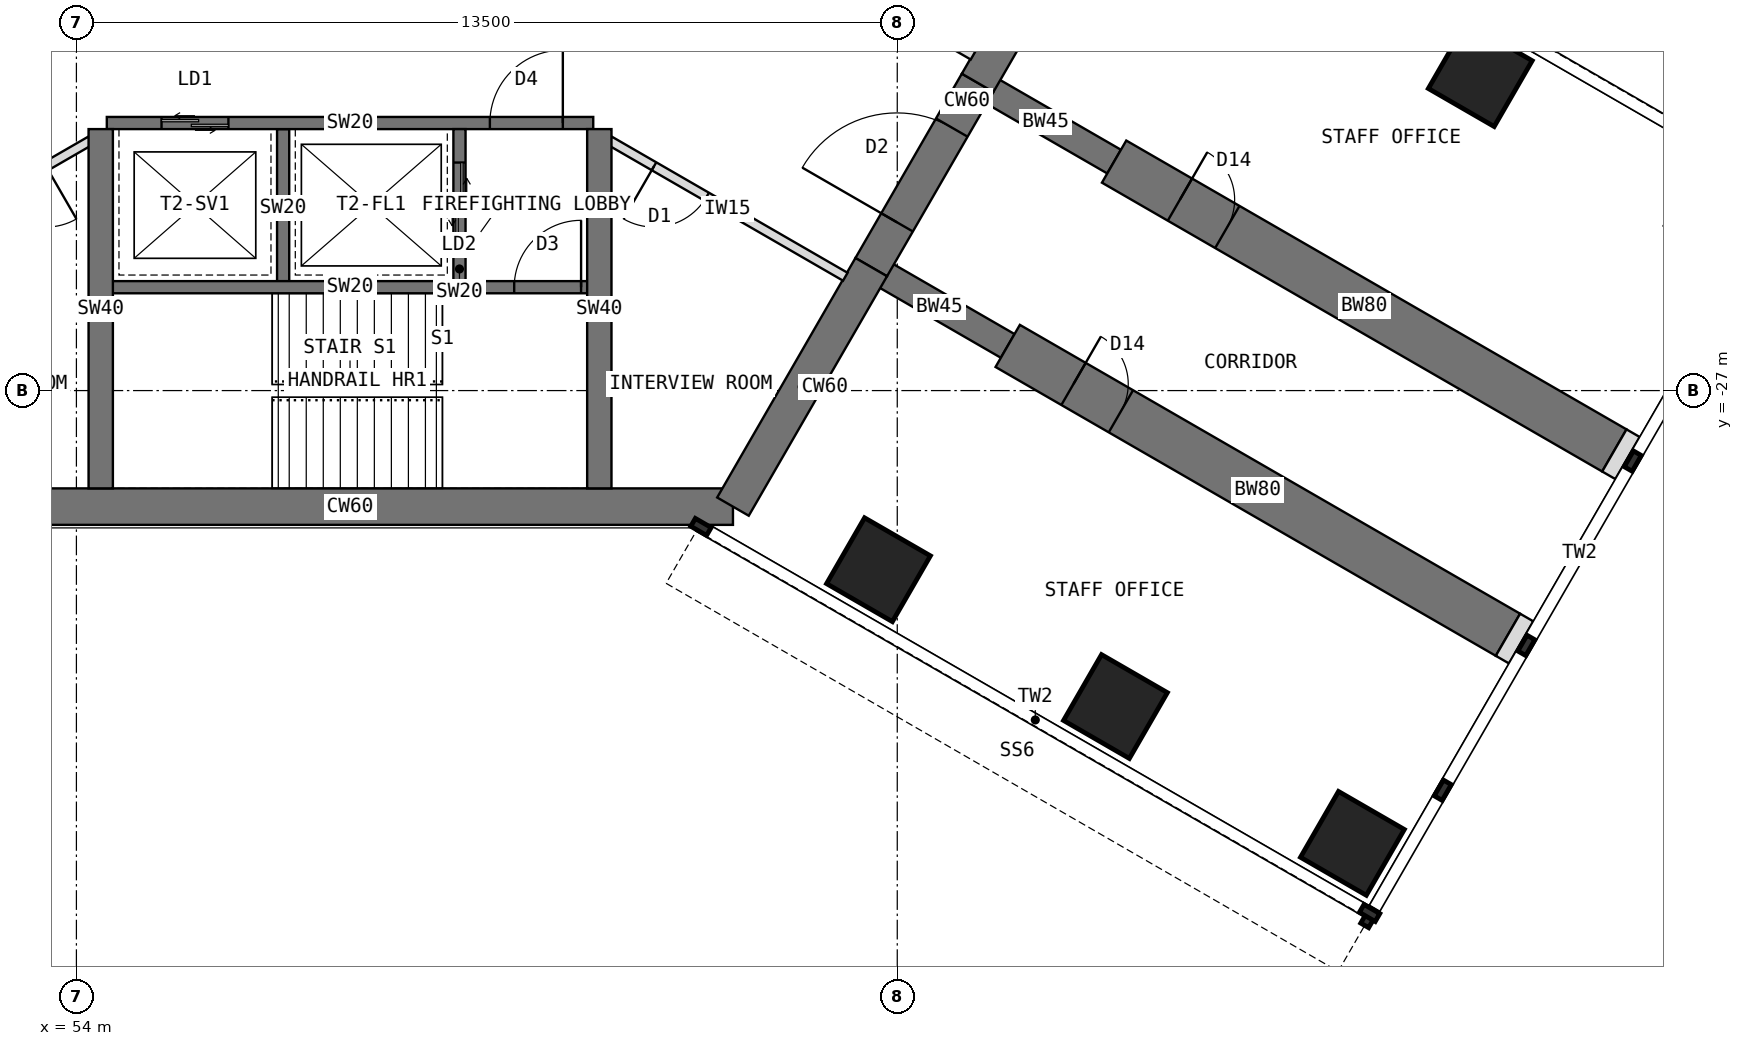
"""IFC4 building model, lengths in metres.
Left out: names, types, materials, properties, quantities, classifications, styles, units other than length and angle.
Written with IfcOpenShell. Run it as: python <this file> out.ifc"""

import sys

from ifc_helpers import new_model, si_unit, direction, frame, frame_2d, origin, origin_2d, place, context, subcontext, project, spatial, rectangle, extrude, element, fill, save


model = new_model("IFC4")
c1 = context("Model", 3, precision=1e-05, world=origin(), true_north=direction((0.0, 1.0)))
c2 = subcontext(c1, "Body", "Model", "MODEL_VIEW")
j1 = project(units=[si_unit("LENGTHUNIT", "METRE"), si_unit("PLANEANGLEUNIT", "RADIAN")], contexts=[c1])
p1 = place(None, origin())
s1 = spatial("IfcSite", under=j1, at=p1, CompositionType="ELEMENT")
p2 = place(p1, origin())
s2 = spatial("IfcBuilding", under=s1, at=p2, CompositionType="ELEMENT")
p3 = place(p2, frame((0.0, 0.0, 157.5)))
s3 = spatial("IfcBuildingStorey", under=s2, at=p3, CompositionType="ELEMENT", Elevation=157.5)
p4 = place(p3, frame((52.202, -28.908, 0.0), z_axis=(0.0, 0.0, 1.0), x_axis=(1.0, 0.0, 0.0)))
e1 = element("IfcWall", 1, at=p4, inside=s3, PredefinedType="SHEAR", context=c2, shape_type="SweptSolid", body=[
    extrude(rectangle(XDim=12.596, YDim=0.6, at=frame_2d((6.298, 0.0))), origin(), (0.0, 0.0, 1.0), 4.0),
])
p5 = place(p3, frame((64.798, -28.908, 0.0), z_axis=(0.0, 0.0, 1.0), x_axis=(0.499984222037, 0.866034513004, 0.0)))
e2 = element("IfcWall", 2, at=p5, inside=s3, PredefinedType="SHEAR", context=c2, shape_type="SweptSolid", body=[
    extrude(rectangle(XDim=4.548, YDim=0.6, at=frame_2d((2.274, 0.0))), origin(), (0.0, 0.0, 1.0), 4.0),
])
p6 = place(p3, frame((67.072, -24.97, 0.0), z_axis=(0.0, 0.0, 1.0), x_axis=(0.500010275428, 0.866019471182, 0.0)))
e3 = element("IfcWall", 3, at=p6, inside=s3, PredefinedType="SHEAR", context=c2, shape_type="SweptSolid", body=[
    extrude(rectangle(XDim=3.5, YDim=0.6, at=frame_2d((1.75, 0.0))), origin(), (0.0, 0.0, 1.0), 4.0),
])
p7 = place(p6, frame((0.85, 0.0, 0.0)))
e4 = element("IfcOpeningElement", 4, at=p7, cuts=e3, PredefinedType="OPENING", context=c2, shape_type="SweptSolid", body=[
    extrude(rectangle(XDim=1.8, YDim=2.1, at=frame_2d((0.9, 1.05))), frame((0.0, 0.31, 0.0), z_axis=(0.0, -1.0, 0.0), x_axis=(1.0, 0.0, 0.0)), (0.0, 0.0, 1.0), 0.62),
])
p8 = place(p3, frame((68.822, -21.939, 0.0), z_axis=(0.0, 0.0, 1.0), x_axis=(0.500024481964, 0.866011268655, 0.0)))
e5 = element("IfcWall", 5, at=p8, inside=s3, PredefinedType="SHEAR", context=c2, shape_type="SweptSolid", body=[
    extrude(rectangle(XDim=4.548, YDim=0.6, at=frame_2d((2.274, 0.0))), origin(), (0.0, 0.0, 1.0), 4.0),
])
p9 = place(p3, frame((68.822, -21.939, 0.0), z_axis=(0.0, 0.0, 1.0), x_axis=(0.866072649678, -0.499918158782, 0.0)))
e6 = element("IfcWall", 6, at=p9, inside=s3, PredefinedType="SHEAR", context=c2, shape_type="SweptSolid", body=[
    extrude(rectangle(XDim=2.592, YDim=0.45, at=frame_2d((1.296, 0.0))), origin(), (0.0, 0.0, 1.0), 4.0),
])
p10 = place(p3, frame((71.066, -23.234, 0.0), z_axis=(0.0, 0.0, 1.0), x_axis=(0.86602681393, -0.499997557548, 0.0)))
e7 = element("IfcWall", 7, at=p10, inside=s3, PredefinedType="SHEAR", context=c2, shape_type="SweptSolid", body=[
    extrude(rectangle(XDim=9.5, YDim=0.8, at=frame_2d((4.75, 0.0))), origin(), (0.0, 0.0, 1.0), 4.0),
])
p11 = place(p10, frame((1.25, 0.0, 0.0)))
e8 = element("IfcOpeningElement", 8, at=p11, cuts=e7, PredefinedType="OPENING", context=c2, shape_type="SweptSolid", body=[
    extrude(rectangle(XDim=0.9, YDim=2.1, at=frame_2d((0.45, 1.05))), frame((0.0, 0.41, 0.0), z_axis=(0.0, -1.0, 0.0), x_axis=(1.0, 0.0, 0.0)), (0.0, 0.0, 1.0), 0.82),
])
p12 = place(p3, frame((67.072, -24.97, 0.0), z_axis=(0.0, 0.0, 1.0), x_axis=(0.866031863473, -0.499988811324, 0.0)))
e9 = element("IfcWall", 9, at=p12, inside=s3, PredefinedType="SHEAR", context=c2, shape_type="SweptSolid", body=[
    extrude(rectangle(XDim=2.592, YDim=0.45, at=frame_2d((1.296, 0.0))), origin(), (0.0, 0.0, 1.0), 4.0),
])
p13 = place(p3, frame((69.316, -26.266, 0.0), z_axis=(0.0, 0.0, 1.0), x_axis=(0.86602681393, -0.499997557548, 0.0)))
e10 = element("IfcWall", 10, at=p13, inside=s3, PredefinedType="SHEAR", context=c2, shape_type="SweptSolid", body=[
    extrude(rectangle(XDim=9.5, YDim=0.8, at=frame_2d((4.75, 0.0))), origin(), (0.0, 0.0, 1.0), 4.0),
])
p14 = place(p13, frame((1.25, 0.0, 0.0)))
e11 = element("IfcOpeningElement", 11, at=p14, cuts=e10, PredefinedType="OPENING", context=c2, shape_type="SweptSolid", body=[
    extrude(rectangle(XDim=0.9, YDim=2.1, at=frame_2d((0.45, 1.05))), frame((0.0, 0.41, 0.0), z_axis=(0.0, -1.0, 0.0), x_axis=(1.0, 0.0, 0.0)), (0.0, 0.0, 1.0), 0.82),
])
for number, where, z_axis, x_axis in (
    (12, (67.191, -29.946, 0.0), (0.0, 0.0, 1.0), (0.5, 0.866, 0.0)),
    (13, (77.088, -21.804, 0.0), (0.0, 0.0, 1.0), (0.5, 0.866, 0.0)),
    (14, (71.088, -32.196, 0.0), (0.0, 0.0, 1.0), (0.5, 0.866, 0.0)),
    (15, (74.986, -34.446, 0.0), (0.0, 0.0, 1.0), (0.5, 0.866, 0.0)),
):
    element("IfcColumn", number, at=place(p3, frame(where, z_axis=z_axis, x_axis=x_axis)), inside=s3, PredefinedType="COLUMN", context=c2, shape_type="SweptSolid", body=[
        extrude(rectangle(XDim=1.25, YDim=1.25, at=origin_2d()), origin(), (0.0, 0.0, 1.0), 4.0),
    ])
for number, where, z_axis, x_axis in (
    (16, (79.294, -27.984, 0.0), (0.0, 0.0, 1.0), (0.866, -0.5, 0.0)),
    (17, (77.544, -31.016, 0.0), (0.0, 0.0, 1.0), (0.866, -0.5, 0.0)),
):
    element("IfcWall", number, at=place(p3, frame(where, z_axis=z_axis, x_axis=x_axis)), inside=s3, PredefinedType="PARTITIONING", context=c2, shape_type="SweptSolid", body=[
        extrude(rectangle(XDim=0.25, YDim=0.8, at=frame_2d((0.125, 0.0))), origin(), (0.0, 0.0, 1.0), 3.8),
    ])
p15 = place(p3, frame((54.5, -22.6, 0.0), z_axis=(0.0, 0.0, 1.0), x_axis=(1.0, 0.0, 0.0)))
e18 = element("IfcWall", 18, at=p15, inside=s3, PredefinedType="SHEAR", context=c2, shape_type="SweptSolid", body=[
    extrude(rectangle(XDim=8.0, YDim=0.2, at=frame_2d((4.0, 0.0))), origin(), (0.0, 0.0, 1.0), 4.0),
])
p16 = place(p15, frame((6.3, 0.0, 0.0)))
e19 = element("IfcOpeningElement", 19, at=p16, cuts=e18, PredefinedType="OPENING", context=c2, shape_type="SweptSolid", body=[
    extrude(rectangle(XDim=1.2, YDim=2.1, at=frame_2d((0.6, 1.05))), frame((0.0, 0.11, 0.0), z_axis=(0.0, -1.0, 0.0), x_axis=(1.0, 0.0, 0.0)), (0.0, 0.0, 1.0), 0.22),
])
p17 = place(p15, frame((0.9, 0.0, 0.0)))
e20 = element("IfcOpeningElement", 20, at=p17, cuts=e18, PredefinedType="OPENING", context=c2, shape_type="SweptSolid", body=[
    extrude(rectangle(XDim=1.1, YDim=2.2, at=frame_2d((0.55, 1.1))), frame((0.0, 0.11, 0.0), z_axis=(0.0, -1.0, 0.0), x_axis=(1.0, 0.0, 0.0)), (0.0, 0.0, 1.0), 0.22),
])
p18 = place(p3, frame((57.4, -22.7, 0.0), z_axis=(0.0, 0.0, 1.0), x_axis=(0.0, -1.0, 0.0)))
e21 = element("IfcWall", 21, at=p18, inside=s3, PredefinedType="SHEAR", context=c2, shape_type="SweptSolid", body=[
    extrude(rectangle(XDim=2.6, YDim=0.2, at=frame_2d((1.3, 0.0))), origin(), (0.0, 0.0, 1.0), 4.0),
])
p19 = place(p3, frame((60.3, -22.7, 0.0), z_axis=(0.0, 0.0, 1.0), x_axis=(0.0, -1.0, 0.0)))
e22 = element("IfcWall", 22, at=p19, inside=s3, PredefinedType="SHEAR", context=c2, shape_type="SweptSolid", body=[
    extrude(rectangle(XDim=2.6, YDim=0.2, at=frame_2d((1.3, 0.0))), origin(), (0.0, 0.0, 1.0), 4.0),
])
p20 = place(p19, frame((0.55, 0.0, 0.0)))
e23 = element("IfcOpeningElement", 23, at=p20, cuts=e22, PredefinedType="OPENING", context=c2, shape_type="SweptSolid", body=[
    extrude(rectangle(XDim=1.3, YDim=2.2, at=frame_2d((0.65, 1.1))), frame((0.0, 0.11, 0.0), z_axis=(0.0, -1.0, 0.0), x_axis=(1.0, 0.0, 0.0)), (0.0, 0.0, 1.0), 0.22),
])
p21 = place(p3, frame((54.5, -25.3, 0.0), z_axis=(0.0, 0.0, 1.0), x_axis=(1.0, 0.0, 0.0)))
e24 = element("IfcWall", 24, at=p21, inside=s3, PredefinedType="SHEAR", context=c2, shape_type="SweptSolid", body=[
    extrude(rectangle(XDim=8.0, YDim=0.2, at=frame_2d((4.0, 0.0))), origin(), (0.0, 0.0, 1.0), 4.0),
])
p22 = place(p21, frame((6.7, 0.0, 0.0)))
e25 = element("IfcOpeningElement", 25, at=p22, cuts=e24, PredefinedType="OPENING", context=c2, shape_type="SweptSolid", body=[
    extrude(rectangle(XDim=1.1, YDim=2.1, at=frame_2d((0.55, 1.05))), frame((0.0, 0.11, 0.0), z_axis=(0.0, -1.0, 0.0), x_axis=(1.0, 0.0, 0.0)), (0.0, 0.0, 1.0), 0.22),
])
for number, where, z_axis, x_axis in (
    (26, (62.6, -22.7, 0.0), (0.0, 0.0, 1.0), (0.0, -1.0, 0.0)),
    (27, (54.4, -22.7, 0.0), (0.0, 0.0, 1.0), (0.0, -1.0, 0.0)),
):
    element("IfcWall", number, at=place(p3, frame(where, z_axis=z_axis, x_axis=x_axis)), inside=s3, PredefinedType="SHEAR", context=c2, shape_type="SweptSolid", body=[
        extrude(rectangle(XDim=5.908, YDim=0.4, at=frame_2d((2.954, 0.0))), origin(), (0.0, 0.0, 1.0), 4.0),
    ])
p23 = place(p3, frame((64.87, -19.253, 0.0), z_axis=(0.0, 0.0, 1.0), x_axis=(0.866025707867, -0.499999473313, 0.0)))
e28 = element("IfcWall", 28, at=p23, inside=s3, PredefinedType="PARTITIONING", context=c2, shape_type="SweptSolid", body=[
    extrude(rectangle(XDim=4.476, YDim=0.15, at=frame_2d((2.238, 0.0))), origin(), (0.0, 0.0, 1.0), 3.8),
])
p24 = place(p23, frame((0.843, 0.0, 0.0)))
e29 = element("IfcOpeningElement", 29, at=p24, cuts=e28, PredefinedType="OPENING", context=c2, shape_type="SweptSolid", body=[
    extrude(rectangle(XDim=1.0, YDim=2.1, at=frame_2d((0.5, 1.05))), frame((0.0, 0.085, 0.0), z_axis=(0.0, -1.0, 0.0), x_axis=(1.0, 0.0, 0.0)), (0.0, 0.0, 1.0), 0.17),
])
p25 = place(p3, frame((66.646, -25.128, 0.0), z_axis=(0.0, 0.0, 1.0), x_axis=(-0.866025707867, 0.499999473313, 0.0)))
e30 = element("IfcWall", 30, at=p25, inside=s3, PredefinedType="PARTITIONING", context=c2, shape_type="SweptSolid", body=[
    extrude(rectangle(XDim=4.476, YDim=0.15, at=frame_2d((2.238, 0.0))), origin(), (0.0, 0.0, 1.0), 3.8),
])
p26 = place(p25, frame((2.633, 0.0, 0.0)))
e31 = element("IfcOpeningElement", 31, at=p26, cuts=e30, PredefinedType="OPENING", context=c2, shape_type="SweptSolid", body=[
    extrude(rectangle(XDim=1.0, YDim=2.1, at=frame_2d((0.5, 1.05))), frame((0.0, 0.085, 0.0), z_axis=(0.0, -1.0, 0.0), x_axis=(1.0, 0.0, 0.0)), (0.0, 0.0, 1.0), 0.17),
])
p27 = place(p3, frame((54.23, -22.89, 0.0), z_axis=(0.0, 0.0, 1.0), x_axis=(-0.866025707867, -0.499999473313, 0.0)))
e32 = element("IfcWall", 32, at=p27, inside=s3, PredefinedType="PARTITIONING", context=c2, shape_type="SweptSolid", body=[
    extrude(rectangle(XDim=4.476, YDim=0.15, at=frame_2d((2.238, 0.0))), origin(), (0.0, 0.0, 1.0), 3.8),
])
p28 = place(p27, frame((0.843, 0.0, 0.0)))
e33 = element("IfcOpeningElement", 33, at=p28, cuts=e32, PredefinedType="OPENING", context=c2, shape_type="SweptSolid", body=[
    extrude(rectangle(XDim=1.0, YDim=2.1, at=frame_2d((0.5, 1.05))), frame((0.0, 0.085, 0.0), z_axis=(0.0, -1.0, 0.0), x_axis=(1.0, 0.0, 0.0)), (0.0, 0.0, 1.0), 0.17),
])
p29 = place(p16, origin())
e34 = element("IfcDoor", 34, at=p29, inside=s3, OperationType="SINGLE_SWING_RIGHT", PredefinedType="DOOR", context=c2, shape_type="SweptSolid", body=[
    extrude(rectangle(XDim=1.2, YDim=2.1, at=frame_2d((0.6, 1.05))), frame((0.0, 0.025, 0.0), z_axis=(0.0, -1.0, 0.0), x_axis=(1.0, 0.0, 0.0)), (0.0, 0.0, 1.0), 0.05),
])
fill(e19, e34)
p30 = place(p20, origin())
e35 = element("IfcDoor", 35, at=p30, inside=s3, OperationType="DOUBLE_DOOR_SLIDING", PredefinedType="DOOR", context=c2, shape_type="SweptSolid", body=[
    extrude(rectangle(XDim=1.3, YDim=2.2, at=frame_2d((0.65, 1.1))), frame((0.0, 0.025, 0.0), z_axis=(0.0, -1.0, 0.0), x_axis=(1.0, 0.0, 0.0)), (0.0, 0.0, 1.0), 0.05),
])
fill(e23, e35)
p31 = place(p17, origin())
e36 = element("IfcDoor", 36, at=p31, inside=s3, OperationType="DOUBLE_DOOR_SLIDING", PredefinedType="DOOR", context=c2, shape_type="SweptSolid", body=[
    extrude(rectangle(XDim=1.1, YDim=2.2, at=frame_2d((0.55, 1.1))), frame((0.0, 0.025, 0.0), z_axis=(0.0, -1.0, 0.0), x_axis=(1.0, 0.0, 0.0)), (0.0, 0.0, 1.0), 0.05),
])
fill(e20, e36)
p32 = place(p22, origin())
e37 = element("IfcDoor", 37, at=p32, inside=s3, OperationType="SINGLE_SWING_RIGHT", PredefinedType="DOOR", context=c2, shape_type="SweptSolid", body=[
    extrude(rectangle(XDim=1.1, YDim=2.1, at=frame_2d((0.55, 1.05))), frame((0.0, 0.025, 0.0), z_axis=(0.0, -1.0, 0.0), x_axis=(1.0, 0.0, 0.0)), (0.0, 0.0, 1.0), 0.05),
])
fill(e25, e37)
p33 = place(p7, origin())
e38 = element("IfcDoor", 38, at=p33, inside=s3, OperationType="DOUBLE_DOOR_DOUBLE_SWING", PredefinedType="DOOR", context=c2, shape_type="SweptSolid", body=[
    extrude(rectangle(XDim=1.72, YDim=2.06, at=frame_2d((0.9, 1.03))), frame((0.0, 0.025, 0.0), z_axis=(0.0, -1.0, 0.0), x_axis=(1.0, 0.0, 0.0)), (0.0, 0.0, 1.0), 0.05),
    extrude(rectangle(XDim=0.04, YDim=2.1, at=frame_2d((0.02, 1.05))), frame((0.0, 0.3, 0.0), z_axis=(0.0, -1.0, 0.0), x_axis=(1.0, 0.0, 0.0)), (0.0, 0.0, 1.0), 0.6),
    extrude(rectangle(XDim=0.04, YDim=2.1, at=frame_2d((1.78, 1.05))), frame((0.0, 0.3, 0.0), z_axis=(0.0, -1.0, 0.0), x_axis=(1.0, 0.0, 0.0)), (0.0, 0.0, 1.0), 0.6),
    extrude(rectangle(XDim=1.72, YDim=0.04, at=frame_2d((0.9, 2.08))), frame((0.0, 0.3, 0.0), z_axis=(0.0, -1.0, 0.0), x_axis=(1.0, 0.0, 0.0)), (0.0, 0.0, 1.0), 0.6),
])
fill(e4, e38)
p34 = place(p26, origin())
e39 = element("IfcDoor", 39, at=p34, inside=s3, OperationType="SINGLE_SWING_RIGHT", PredefinedType="DOOR", context=c2, shape_type="SweptSolid", body=[
    extrude(rectangle(XDim=1.0, YDim=2.1, at=frame_2d((0.5, 1.05))), frame((0.0, 0.025, 0.0), z_axis=(0.0, -1.0, 0.0), x_axis=(1.0, 0.0, 0.0)), (0.0, 0.0, 1.0), 0.05),
])
fill(e31, e39)
p35 = place(p11, origin())
e40 = element("IfcDoor", 40, at=p35, inside=s3, OperationType="SINGLE_SWING_LEFT", PredefinedType="DOOR", context=c2, shape_type="SweptSolid", body=[
    extrude(rectangle(XDim=0.82, YDim=2.06, at=frame_2d((0.45, 1.03))), frame((0.0, 0.025, 0.0), z_axis=(0.0, -1.0, 0.0), x_axis=(1.0, 0.0, 0.0)), (0.0, 0.0, 1.0), 0.05),
    extrude(rectangle(XDim=0.04, YDim=2.1, at=frame_2d((0.02, 1.05))), frame((0.0, 0.4, 0.0), z_axis=(0.0, -1.0, 0.0), x_axis=(1.0, 0.0, 0.0)), (0.0, 0.0, 1.0), 0.8),
    extrude(rectangle(XDim=0.04, YDim=2.1, at=frame_2d((0.88, 1.05))), frame((0.0, 0.4, 0.0), z_axis=(0.0, -1.0, 0.0), x_axis=(1.0, 0.0, 0.0)), (0.0, 0.0, 1.0), 0.8),
    extrude(rectangle(XDim=0.82, YDim=0.04, at=frame_2d((0.45, 2.08))), frame((0.0, 0.4, 0.0), z_axis=(0.0, -1.0, 0.0), x_axis=(1.0, 0.0, 0.0)), (0.0, 0.0, 1.0), 0.8),
])
fill(e8, e40)
p36 = place(p14, origin())
e41 = element("IfcDoor", 41, at=p36, inside=s3, OperationType="SINGLE_SWING_LEFT", PredefinedType="DOOR", context=c2, shape_type="SweptSolid", body=[
    extrude(rectangle(XDim=0.82, YDim=2.06, at=frame_2d((0.45, 1.03))), frame((0.0, 0.025, 0.0), z_axis=(0.0, -1.0, 0.0), x_axis=(1.0, 0.0, 0.0)), (0.0, 0.0, 1.0), 0.05),
    extrude(rectangle(XDim=0.04, YDim=2.1, at=frame_2d((0.02, 1.05))), frame((0.0, 0.4, 0.0), z_axis=(0.0, -1.0, 0.0), x_axis=(1.0, 0.0, 0.0)), (0.0, 0.0, 1.0), 0.8),
    extrude(rectangle(XDim=0.04, YDim=2.1, at=frame_2d((0.88, 1.05))), frame((0.0, 0.4, 0.0), z_axis=(0.0, -1.0, 0.0), x_axis=(1.0, 0.0, 0.0)), (0.0, 0.0, 1.0), 0.8),
    extrude(rectangle(XDim=0.82, YDim=0.04, at=frame_2d((0.45, 2.08))), frame((0.0, 0.4, 0.0), z_axis=(0.0, -1.0, 0.0), x_axis=(1.0, 0.0, 0.0)), (0.0, 0.0, 1.0), 0.8),
])
fill(e11, e41)
save(model, sys.argv[1])
